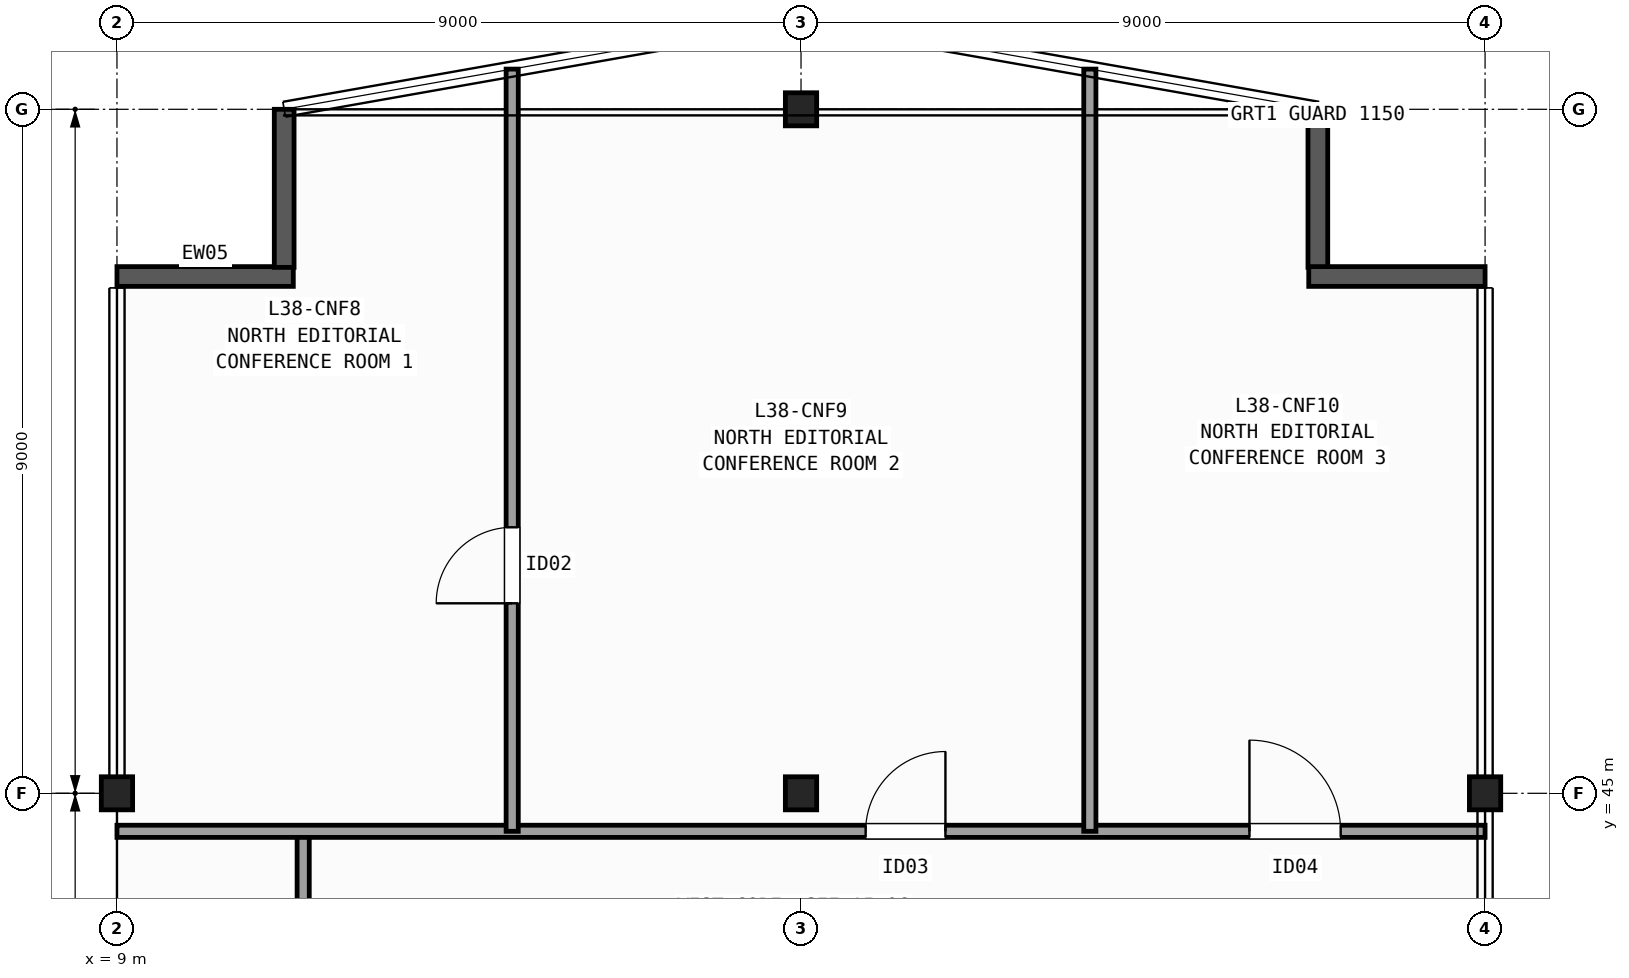
"""IFC4 building model, lengths in metres.
Left out: names, types, materials, properties, quantities, classifications, styles, units other than length and angle.
Written with IfcOpenShell. Run it as: python <this file> out.ifc"""

import sys

from ifc_helpers import new_model, si_unit, direction, frame, frame_2d, origin, origin_2d, place, context, subcontext, project, spatial, rectangle, i_section, extrude, element, fill, save


model = new_model("IFC4")
c1 = context("Model", 3, precision=1e-05, world=origin(), true_north=direction((0.0, 1.0)))
c2 = subcontext(c1, "Body", "Model", "MODEL_VIEW")
j1 = project(units=[si_unit("LENGTHUNIT", "METRE"), si_unit("PLANEANGLEUNIT", "RADIAN")], contexts=[c1])
p1 = place(None, origin())
s1 = spatial("IfcSite", under=j1, at=p1, CompositionType="ELEMENT")
p2 = place(p1, origin())
s2 = spatial("IfcBuilding", under=s1, at=p2, CompositionType="ELEMENT")
p3 = place(p2, frame((0.0, 0.0, 154.4)))
s3 = spatial("IfcBuildingStorey", under=s2, at=p3, CompositionType="ELEMENT", Elevation=154.4)
for number, where, z_axis, x_axis in (
    (1, (9.0, 45.0, 0.0), (0.0, 0.0, 1.0), (1.0, 0.0, 0.0)),
    (2, (18.0, 45.0, 0.0), (0.0, 0.0, 1.0), (1.0, 0.0, 0.0)),
    (3, (18.0, 54.0, 0.0), (0.0, 0.0, 1.0), (1.0, 0.0, 0.0)),
    (4, (27.0, 45.0, 0.0), (0.0, 0.0, 1.0), (1.0, 0.0, 0.0)),
):
    element("IfcColumn", number, at=place(p3, frame(where, z_axis=z_axis, x_axis=x_axis)), inside=s3, PredefinedType="COLUMN", context=c2, shape_type="SweptSolid", body=[
        extrude(i_section(OverallWidth=0.412, OverallDepth=0.435, WebThickness=0.036, FlangeThickness=0.057, FilletRadius=0.015, at=origin_2d()), origin(), (0.0, 0.0, 1.0), 3.7),
    ])
p4 = place(p3, frame((9.0, 51.8, 0.0), z_axis=(0.0, 0.0, 1.0), x_axis=(1.0, 0.0, 0.0)))
e5 = element("IfcWall", 5, at=p4, inside=s3, PredefinedType="SOLIDWALL", context=c2, shape_type="SweptSolid", body=[
    extrude(rectangle(XDim=2.32, YDim=0.26, at=frame_2d((1.16, 0.0))), origin(), (0.0, 0.0, 1.0), 3.42),
])
for number, where, z_axis, x_axis in (
    (6, (11.2, 51.92, 0.0), (0.0, 0.0, 1.0), (0.0, 1.0, 0.0)),
    (7, (24.8, 54.0, 0.0), (0.0, 0.0, 1.0), (0.0, -1.0, 0.0)),
):
    element("IfcWall", number, at=place(p3, frame(where, z_axis=z_axis, x_axis=x_axis)), inside=s3, PredefinedType="SOLIDWALL", context=c2, shape_type="SweptSolid", body=[
        extrude(rectangle(XDim=2.08, YDim=0.26, at=frame_2d((1.04, 0.0))), origin(), (0.0, 0.0, 1.0), 3.42),
    ])
p5 = place(p3, frame((24.68, 51.8, 0.0), z_axis=(0.0, 0.0, 1.0), x_axis=(1.0, 0.0, 0.0)))
e8 = element("IfcWall", 8, at=p5, inside=s3, PredefinedType="SOLIDWALL", context=c2, shape_type="SweptSolid", body=[
    extrude(rectangle(XDim=2.32, YDim=0.26, at=frame_2d((1.16, 0.0))), origin(), (0.0, 0.0, 1.0), 3.42),
])
p6 = place(p3, frame((11.45, 42.4, 0.0), z_axis=(0.0, 0.0, 1.0), x_axis=(0.0, 1.0, 0.0)))
e9 = element("IfcWall", 9, at=p6, inside=s3, PredefinedType="PARTITIONING", context=c2, shape_type="SweptSolid", body=[
    extrude(rectangle(XDim=2.1, YDim=0.16, at=frame_2d((1.05, 0.0))), origin(), (0.0, 0.0, 1.0), 3.42),
])
p7 = place(p3, frame((9.0, 44.5, 0.0), z_axis=(0.0, 0.0, 1.0), x_axis=(1.0, 0.0, 0.0)))
e10 = element("IfcWall", 10, at=p7, inside=s3, PredefinedType="PARTITIONING", context=c2, shape_type="SweptSolid", body=[
    extrude(rectangle(XDim=18.0, YDim=0.16, at=frame_2d((9.0, 0.0))), origin(), (0.0, 0.0, 1.0), 2.634),
])
p8 = place(p7, frame((9.85, 0.0, 0.0)))
e11 = element("IfcOpeningElement", 11, at=p8, cuts=e10, PredefinedType="OPENING", context=c2, shape_type="SweptSolid", body=[
    extrude(rectangle(XDim=1.05, YDim=2.15, at=frame_2d((0.525, 1.075))), frame((0.0, 0.09, 0.0), z_axis=(0.0, -1.0, 0.0), x_axis=(1.0, 0.0, 0.0)), (0.0, 0.0, 1.0), 0.18),
])
p9 = place(p7, frame((14.9, 0.0, 0.0)))
e12 = element("IfcOpeningElement", 12, at=p9, cuts=e10, PredefinedType="OPENING", context=c2, shape_type="SweptSolid", body=[
    extrude(rectangle(XDim=1.2, YDim=2.15, at=frame_2d((0.6, 1.075))), frame((0.0, 0.09, 0.0), z_axis=(0.0, -1.0, 0.0), x_axis=(1.0, 0.0, 0.0)), (0.0, 0.0, 1.0), 0.18),
])
p10 = place(p3, frame((14.2, 44.5, 0.0), z_axis=(0.0, 0.0, 1.0), x_axis=(0.0, 1.0, 0.0)))
e13 = element("IfcWall", 13, at=p10, inside=s3, PredefinedType="PARTITIONING", context=c2, shape_type="SweptSolid", body=[
    extrude(rectangle(XDim=10.029, YDim=0.16, at=frame_2d((5.015, 0.0))), origin(), (0.0, 0.0, 1.0), 3.42),
])
p11 = place(p10, frame((3.0, 0.0, 0.0)))
e14 = element("IfcOpeningElement", 14, at=p11, cuts=e13, PredefinedType="OPENING", context=c2, shape_type="SweptSolid", body=[
    extrude(rectangle(XDim=1.0, YDim=2.1, at=frame_2d((0.5, 1.05))), frame((0.0, 0.09, 0.0), z_axis=(0.0, -1.0, 0.0), x_axis=(1.0, 0.0, 0.0)), (0.0, 0.0, 1.0), 0.18),
])
p12 = place(p3, frame((21.8, 44.5, 0.0), z_axis=(0.0, 0.0, 1.0), x_axis=(0.0, 1.0, 0.0)))
e15 = element("IfcWall", 15, at=p12, inside=s3, PredefinedType="PARTITIONING", context=c2, shape_type="SweptSolid", body=[
    extrude(rectangle(XDim=10.029, YDim=0.16, at=frame_2d((5.015, 0.0))), origin(), (0.0, 0.0, 1.0), 3.42),
])
p13 = place(p11, origin())
e16 = element("IfcDoor", 16, at=p13, inside=s3, OperationType="SINGLE_SWING_LEFT", PredefinedType="DOOR", context=c2, shape_type="SweptSolid", body=[
    extrude(rectangle(XDim=1.0, YDim=2.1, at=frame_2d((0.5, 1.05))), frame((0.0, 0.025, 0.0), z_axis=(0.0, -1.0, 0.0), x_axis=(1.0, 0.0, 0.0)), (0.0, 0.0, 1.0), 0.05),
])
fill(e14, e16)
p14 = place(p8, origin())
e17 = element("IfcDoor", 17, at=p14, inside=s3, OperationType="SINGLE_SWING_RIGHT", PredefinedType="DOOR", context=c2, shape_type="SweptSolid", body=[
    extrude(rectangle(XDim=1.05, YDim=2.15, at=frame_2d((0.525, 1.075))), frame((0.0, 0.025, 0.0), z_axis=(0.0, -1.0, 0.0), x_axis=(1.0, 0.0, 0.0)), (0.0, 0.0, 1.0), 0.05),
])
fill(e11, e17)
p15 = place(p9, origin())
e18 = element("IfcDoor", 18, at=p15, inside=s3, OperationType="SINGLE_SWING_LEFT", PredefinedType="DOOR", context=c2, shape_type="SweptSolid", body=[
    extrude(rectangle(XDim=1.2, YDim=2.15, at=frame_2d((0.6, 1.075))), frame((0.0, 0.025, 0.0), z_axis=(0.0, -1.0, 0.0), x_axis=(1.0, 0.0, 0.0)), (0.0, 0.0, 1.0), 0.05),
])
fill(e12, e18)
save(model, sys.argv[1])
